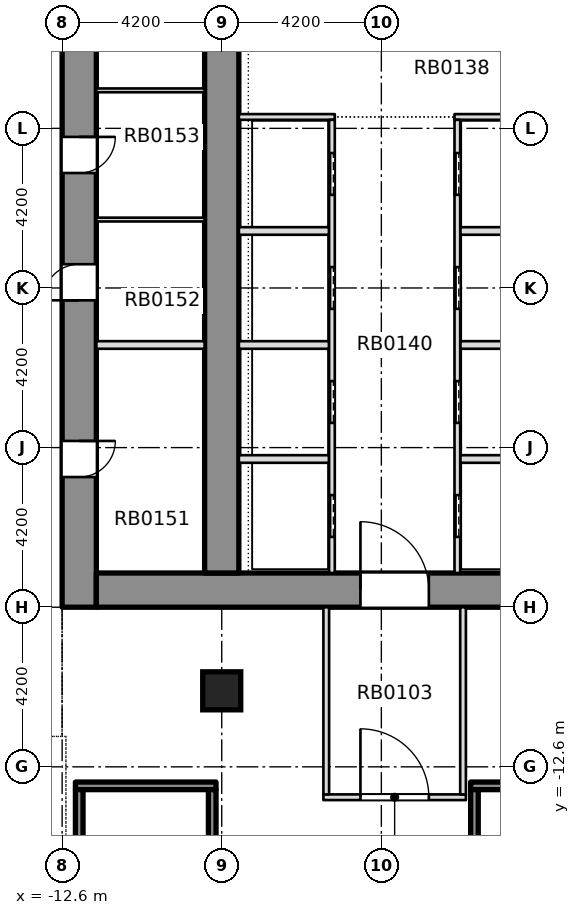
"""IFC4 building model, lengths in metres.
Left out: names, types, materials, properties, quantities, classifications, styles, units other than length and angle.
Written with IfcOpenShell. Run it as: python <this file> out.ifc"""

import sys

from ifc_helpers import new_model, si_unit, direction, frame, frame_2d, origin, origin_2d, place, context, subcontext, project, spatial, rectangle, extrude, element, fill, save


model = new_model("IFC4")
c1 = context("Model", 3, precision=1e-05, world=origin(), true_north=direction((0.0, 1.0)))
c2 = subcontext(c1, "Body", "Model", "MODEL_VIEW")
j1 = project(units=[si_unit("LENGTHUNIT", "METRE"), si_unit("PLANEANGLEUNIT", "RADIAN")], contexts=[c1])
p1 = place(None, origin())
s1 = spatial("IfcSite", under=j1, at=p1, CompositionType="ELEMENT")
p2 = place(p1, origin())
s2 = spatial("IfcBuilding", under=s1, at=p2, CompositionType="ELEMENT")
p3 = place(p2, frame((0.0, 0.0, -4.2)))
s3 = spatial("IfcBuildingStorey", under=s2, at=p3, CompositionType="ELEMENT", Elevation=-4.2)
p4 = place(p3, frame((-12.15, -8.4, -0.35), z_axis=(0.0, 0.0, 1.0), x_axis=(0.0, 1.0, 0.0)))
e1 = element("IfcWall", 1, at=p4, inside=s3, PredefinedType="SHEAR", context=c2, shape_type="SweptSolid", body=[
    extrude(rectangle(XDim=30.15, YDim=0.9, at=frame_2d((15.075, 0.0))), origin(), (0.0, 0.0, 1.0), 4.1),
])
p5 = place(p4, frame((3.425, 0.0, 0.35)))
e2 = element("IfcOpeningElement", 2, at=p5, cuts=e1, PredefinedType="OPENING", context=c2, shape_type="SweptSolid", body=[
    extrude(rectangle(XDim=0.95, YDim=2.1, at=frame_2d((0.475, 1.05))), frame((0.0, 0.46, 0.0), z_axis=(0.0, -1.0, 0.0), x_axis=(1.0, 0.0, 0.0)), (0.0, 0.0, 1.0), 0.92),
])
p6 = place(p4, frame((8.075, 0.0, 0.35)))
e3 = element("IfcOpeningElement", 3, at=p6, cuts=e1, PredefinedType="OPENING", context=c2, shape_type="SweptSolid", body=[
    extrude(rectangle(XDim=0.95, YDim=2.1, at=frame_2d((0.475, 1.05))), frame((0.0, 0.46, 0.0), z_axis=(0.0, -1.0, 0.0), x_axis=(1.0, 0.0, 0.0)), (0.0, 0.0, 1.0), 0.92),
])
p7 = place(p4, frame((11.425, 0.0, 0.35)))
e4 = element("IfcOpeningElement", 4, at=p7, cuts=e1, PredefinedType="OPENING", context=c2, shape_type="SweptSolid", body=[
    extrude(rectangle(XDim=0.95, YDim=2.1, at=frame_2d((0.475, 1.05))), frame((0.0, 0.46, 0.0), z_axis=(0.0, -1.0, 0.0), x_axis=(1.0, 0.0, 0.0)), (0.0, 0.0, 1.0), 0.92),
])
p8 = place(p4, frame((15.625, 0.0, 0.35)))
e5 = element("IfcOpeningElement", 5, at=p8, cuts=e1, PredefinedType="OPENING", context=c2, shape_type="SweptSolid", body=[
    extrude(rectangle(XDim=0.95, YDim=2.1, at=frame_2d((0.475, 1.05))), frame((0.0, 0.46, 0.0), z_axis=(0.0, -1.0, 0.0), x_axis=(1.0, 0.0, 0.0)), (0.0, 0.0, 1.0), 0.92),
])
p9 = place(p4, frame((22.725, 0.0, 0.35)))
e6 = element("IfcOpeningElement", 6, at=p9, cuts=e1, PredefinedType="OPENING", context=c2, shape_type="SweptSolid", body=[
    extrude(rectangle(XDim=0.95, YDim=2.1, at=frame_2d((0.475, 1.05))), frame((0.0, 0.46, 0.0), z_axis=(0.0, -1.0, 0.0), x_axis=(1.0, 0.0, 0.0)), (0.0, 0.0, 1.0), 0.92),
])
p10 = place(p4, frame((26.75, 0.0, 0.35)))
e7 = element("IfcOpeningElement", 7, at=p10, cuts=e1, PredefinedType="OPENING", context=c2, shape_type="SweptSolid", body=[
    extrude(rectangle(XDim=0.95, YDim=2.1, at=frame_2d((0.475, 1.05))), frame((0.0, 0.46, 0.0), z_axis=(0.0, -1.0, 0.0), x_axis=(1.0, 0.0, 0.0)), (0.0, 0.0, 1.0), 0.92),
])
p11 = place(p4, frame((19.3, 0.0, 0.35)))
e8 = element("IfcOpeningElement", 8, at=p11, cuts=e1, PredefinedType="OPENING", context=c2, shape_type="SweptSolid", body=[
    extrude(rectangle(XDim=1.2, YDim=2.1, at=frame_2d((0.6, 1.05))), frame((0.0, 0.46, 0.0), z_axis=(0.0, -1.0, 0.0), x_axis=(1.0, 0.0, 0.0)), (0.0, 0.0, 1.0), 0.92),
])
p12 = place(p3, frame((-11.7, -7.95, -0.35), z_axis=(0.0, 0.0, 1.0), x_axis=(1.0, 0.0, 0.0)))
e9 = element("IfcWall", 9, at=p12, inside=s3, PredefinedType="SHEAR", context=c2, shape_type="SweptSolid", body=[
    extrude(rectangle(XDim=23.4, YDim=0.9, at=frame_2d((11.7, 0.0))), origin(), (0.0, 0.0, 1.0), 4.1),
])
p13 = place(p12, frame((6.95, 0.0, 0.35)))
e10 = element("IfcOpeningElement", 10, at=p13, cuts=e9, PredefinedType="OPENING", context=c2, shape_type="SweptSolid", body=[
    extrude(rectangle(XDim=1.8, YDim=2.1, at=frame_2d((0.9, 1.05))), frame((0.0, 0.46, 0.0), z_axis=(0.0, -1.0, 0.0), x_axis=(1.0, 0.0, 0.0)), (0.0, 0.0, 1.0), 0.92),
])
p14 = place(p12, frame((14.65, 0.0, 0.35)))
e11 = element("IfcOpeningElement", 11, at=p14, cuts=e9, PredefinedType="OPENING", context=c2, shape_type="SweptSolid", body=[
    extrude(rectangle(XDim=1.8, YDim=2.1, at=frame_2d((0.9, 1.05))), frame((0.0, 0.46, 0.0), z_axis=(0.0, -1.0, 0.0), x_axis=(1.0, 0.0, 0.0)), (0.0, 0.0, 1.0), 0.92),
])
p15 = place(p3, frame((-8.4, -7.5, -0.35), z_axis=(0.0, 0.0, 1.0), x_axis=(0.0, 1.0, 0.0)))
e12 = element("IfcWall", 12, at=p15, inside=s3, PredefinedType="SHEAR", context=c2, shape_type="SweptSolid", body=[
    extrude(rectangle(XDim=28.35, YDim=0.9, at=frame_2d((14.175, 0.0))), origin(), (0.0, 0.0, 1.0), 4.1),
])
p16 = place(p15, frame((18.4, 0.0, 0.35)))
e13 = element("IfcOpeningElement", 13, at=p16, cuts=e12, PredefinedType="OPENING", context=c2, shape_type="SweptSolid", body=[
    extrude(rectangle(XDim=1.2, YDim=2.1, at=frame_2d((0.6, 1.05))), frame((0.0, 0.46, 0.0), z_axis=(0.0, -1.0, 0.0), x_axis=(1.0, 0.0, 0.0)), (0.0, 0.0, 1.0), 0.92),
])
p17 = place(p3, frame((-8.4, -10.6, -0.35), z_axis=(0.0, 0.0, 1.0), x_axis=(1.0, 0.0, 0.0)))
e14 = element("IfcColumn", 14, at=p17, inside=s3, PredefinedType="COLUMN", context=c2, shape_type="SweptSolid", body=[
    extrude(rectangle(XDim=1.0, YDim=1.0, at=origin_2d()), origin(), (0.0, 0.0, 1.0), 4.1),
])
p18 = place(p3, frame((-5.725, -13.4, 0.0), z_axis=(0.0, 0.0, 1.0), x_axis=(1.0, 0.0, 0.0)))
e15 = element("IfcWall", 15, at=p18, inside=s3, PredefinedType="PARTITIONING", context=c2, shape_type="SweptSolid", body=[
    extrude(rectangle(XDim=3.75, YDim=0.15, at=frame_2d((1.875, 0.0))), origin(), (0.0, 0.0, 1.0), 3.75),
])
p19 = place(p18, frame((0.975, 0.0, 0.0)))
e16 = element("IfcOpeningElement", 16, at=p19, cuts=e15, PredefinedType="OPENING", context=c2, shape_type="SweptSolid", body=[
    extrude(rectangle(XDim=1.8, YDim=2.1, at=frame_2d((0.9, 1.05))), frame((0.0, 0.085, 0.0), z_axis=(0.0, -1.0, 0.0), x_axis=(1.0, 0.0, 0.0)), (0.0, 0.0, 1.0), 0.17),
])
for number, where, z_axis, x_axis in (
    (17, (-5.65, -13.325, 0.0), (0.0, 0.0, 1.0), (0.0, 1.0, 0.0)),
    (18, (-2.05, -13.325, 0.0), (0.0, 0.0, 1.0), (0.0, 1.0, 0.0)),
):
    element("IfcWall", number, at=place(p3, frame(where, z_axis=z_axis, x_axis=x_axis)), inside=s3, PredefinedType="PARTITIONING", context=c2, shape_type="SweptSolid", body=[
        extrude(rectangle(XDim=4.924, YDim=0.15, at=frame_2d((2.462, 0.0))), origin(), (0.0, 0.0, 1.0), 3.75),
    ])
p20 = place(p3, frame((-7.949, -4.5, 0.0), z_axis=(0.0, 0.0, 1.0), x_axis=(1.0, 0.0, 0.0)))
e19 = element("IfcWall", 19, at=p20, inside=s3, PredefinedType="PARTITIONING", context=c2, shape_type="SweptSolid", body=[
    extrude(rectangle(XDim=2.374, YDim=0.2, at=frame_2d((1.187, 0.0))), origin(), (0.0, 0.0, 1.0), 3.75),
])
p21 = place(p3, frame((-2.125, -4.5, 0.0), z_axis=(0.0, 0.0, 1.0), x_axis=(1.0, 0.0, 0.0)))
e20 = element("IfcWall", 20, at=p21, inside=s3, PredefinedType="PARTITIONING", context=c2, shape_type="SweptSolid", body=[
    extrude(rectangle(XDim=4.25, YDim=0.2, at=frame_2d((2.125, 0.0))), origin(), (0.0, 0.0, 1.0), 3.75),
])
p22 = place(p3, frame((-7.949, -1.5, 0.0), z_axis=(0.0, 0.0, 1.0), x_axis=(1.0, 0.0, 0.0)))
e21 = element("IfcWall", 21, at=p22, inside=s3, PredefinedType="PARTITIONING", context=c2, shape_type="SweptSolid", body=[
    extrude(rectangle(XDim=2.374, YDim=0.2, at=frame_2d((1.187, 0.0))), origin(), (0.0, 0.0, 1.0), 3.75),
])
p23 = place(p3, frame((-2.125, -1.5, 0.0), z_axis=(0.0, 0.0, 1.0), x_axis=(1.0, 0.0, 0.0)))
e22 = element("IfcWall", 22, at=p23, inside=s3, PredefinedType="PARTITIONING", context=c2, shape_type="SweptSolid", body=[
    extrude(rectangle(XDim=4.25, YDim=0.2, at=frame_2d((2.125, 0.0))), origin(), (0.0, 0.0, 1.0), 3.75),
])
p24 = place(p3, frame((-7.949, 1.5, 0.0), z_axis=(0.0, 0.0, 1.0), x_axis=(1.0, 0.0, 0.0)))
e23 = element("IfcWall", 23, at=p24, inside=s3, PredefinedType="PARTITIONING", context=c2, shape_type="SweptSolid", body=[
    extrude(rectangle(XDim=2.374, YDim=0.2, at=frame_2d((1.187, 0.0))), origin(), (0.0, 0.0, 1.0), 3.75),
])
p25 = place(p3, frame((-2.125, 1.5, 0.0), z_axis=(0.0, 0.0, 1.0), x_axis=(1.0, 0.0, 0.0)))
e24 = element("IfcWall", 24, at=p25, inside=s3, PredefinedType="PARTITIONING", context=c2, shape_type="SweptSolid", body=[
    extrude(rectangle(XDim=4.25, YDim=0.2, at=frame_2d((2.125, 0.0))), origin(), (0.0, 0.0, 1.0), 3.75),
])
p26 = place(p3, frame((-7.949, 4.5, 0.0), z_axis=(0.0, 0.0, 1.0), x_axis=(1.0, 0.0, 0.0)))
e25 = element("IfcWall", 25, at=p26, inside=s3, PredefinedType="PARTITIONING", context=c2, shape_type="SweptSolid", body=[
    extrude(rectangle(XDim=2.524, YDim=0.15, at=frame_2d((1.262, 0.0))), origin(), (0.0, 0.0, 1.0), 3.75),
])
p27 = place(p3, frame((-2.275, 4.5, 0.0), z_axis=(0.0, 0.0, 1.0), x_axis=(1.0, 0.0, 0.0)))
e26 = element("IfcWall", 26, at=p27, inside=s3, PredefinedType="PARTITIONING", context=c2, shape_type="SweptSolid", body=[
    extrude(rectangle(XDim=4.55, YDim=0.15, at=frame_2d((2.275, 0.0))), origin(), (0.0, 0.0, 1.0), 3.75),
])
p28 = place(p3, frame((-5.5, -7.499, 0.0), z_axis=(0.0, 0.0, 1.0), x_axis=(0.0, 1.0, 0.0)))
e27 = element("IfcWall", 27, at=p28, inside=s3, PredefinedType="PARTITIONING", context=c2, shape_type="SweptSolid", body=[
    extrude(rectangle(XDim=11.924, YDim=0.15, at=frame_2d((5.962, 0.0))), origin(), (0.0, 0.0, 1.0), 3.75),
])
p29 = place(p28, frame((0.949, 0.0, 0.0)))
e28 = element("IfcOpeningElement", 28, at=p29, cuts=e27, PredefinedType="OPENING", context=c2, shape_type="SweptSolid", body=[
    extrude(rectangle(XDim=1.1, YDim=2.1, at=frame_2d((0.55, 1.05))), frame((0.0, 0.085, 0.0), z_axis=(0.0, -1.0, 0.0), x_axis=(1.0, 0.0, 0.0)), (0.0, 0.0, 1.0), 0.17),
])
p30 = place(p28, frame((3.949, 0.0, 0.0)))
e29 = element("IfcOpeningElement", 29, at=p30, cuts=e27, PredefinedType="OPENING", context=c2, shape_type="SweptSolid", body=[
    extrude(rectangle(XDim=1.1, YDim=2.1, at=frame_2d((0.55, 1.05))), frame((0.0, 0.085, 0.0), z_axis=(0.0, -1.0, 0.0), x_axis=(1.0, 0.0, 0.0)), (0.0, 0.0, 1.0), 0.17),
])
p31 = place(p28, frame((6.949, 0.0, 0.0)))
e30 = element("IfcOpeningElement", 30, at=p31, cuts=e27, PredefinedType="OPENING", context=c2, shape_type="SweptSolid", body=[
    extrude(rectangle(XDim=1.1, YDim=2.1, at=frame_2d((0.55, 1.05))), frame((0.0, 0.085, 0.0), z_axis=(0.0, -1.0, 0.0), x_axis=(1.0, 0.0, 0.0)), (0.0, 0.0, 1.0), 0.17),
])
p32 = place(p28, frame((9.949, 0.0, 0.0)))
e31 = element("IfcOpeningElement", 31, at=p32, cuts=e27, PredefinedType="OPENING", context=c2, shape_type="SweptSolid", body=[
    extrude(rectangle(XDim=1.1, YDim=2.1, at=frame_2d((0.55, 1.05))), frame((0.0, 0.085, 0.0), z_axis=(0.0, -1.0, 0.0), x_axis=(1.0, 0.0, 0.0)), (0.0, 0.0, 1.0), 0.17),
])
p33 = place(p3, frame((-2.2, -7.499, 0.0), z_axis=(0.0, 0.0, 1.0), x_axis=(0.0, 1.0, 0.0)))
e32 = element("IfcWall", 32, at=p33, inside=s3, PredefinedType="PARTITIONING", context=c2, shape_type="SweptSolid", body=[
    extrude(rectangle(XDim=11.924, YDim=0.15, at=frame_2d((5.962, 0.0))), origin(), (0.0, 0.0, 1.0), 3.75),
])
p34 = place(p33, frame((0.949, 0.0, 0.0)))
e33 = element("IfcOpeningElement", 33, at=p34, cuts=e32, PredefinedType="OPENING", context=c2, shape_type="SweptSolid", body=[
    extrude(rectangle(XDim=1.1, YDim=2.1, at=frame_2d((0.55, 1.05))), frame((0.0, 0.085, 0.0), z_axis=(0.0, -1.0, 0.0), x_axis=(1.0, 0.0, 0.0)), (0.0, 0.0, 1.0), 0.17),
])
p35 = place(p33, frame((3.949, 0.0, 0.0)))
e34 = element("IfcOpeningElement", 34, at=p35, cuts=e32, PredefinedType="OPENING", context=c2, shape_type="SweptSolid", body=[
    extrude(rectangle(XDim=1.1, YDim=2.1, at=frame_2d((0.55, 1.05))), frame((0.0, 0.085, 0.0), z_axis=(0.0, -1.0, 0.0), x_axis=(1.0, 0.0, 0.0)), (0.0, 0.0, 1.0), 0.17),
])
p36 = place(p33, frame((6.949, 0.0, 0.0)))
e35 = element("IfcOpeningElement", 35, at=p36, cuts=e32, PredefinedType="OPENING", context=c2, shape_type="SweptSolid", body=[
    extrude(rectangle(XDim=1.1, YDim=2.1, at=frame_2d((0.55, 1.05))), frame((0.0, 0.085, 0.0), z_axis=(0.0, -1.0, 0.0), x_axis=(1.0, 0.0, 0.0)), (0.0, 0.0, 1.0), 0.17),
])
p37 = place(p33, frame((9.949, 0.0, 0.0)))
e36 = element("IfcOpeningElement", 36, at=p37, cuts=e32, PredefinedType="OPENING", context=c2, shape_type="SweptSolid", body=[
    extrude(rectangle(XDim=1.1, YDim=2.1, at=frame_2d((0.55, 1.05))), frame((0.0, 0.085, 0.0), z_axis=(0.0, -1.0, 0.0), x_axis=(1.0, 0.0, 0.0)), (0.0, 0.0, 1.0), 0.17),
])
p38 = place(p3, frame((-11.699, -1.5, 0.0), z_axis=(0.0, 0.0, 1.0), x_axis=(1.0, 0.0, 0.0)))
e37 = element("IfcWall", 37, at=p38, inside=s3, PredefinedType="PARTITIONING", context=c2, shape_type="SweptSolid", body=[
    extrude(rectangle(XDim=2.848, YDim=0.2, at=frame_2d((1.424, 0.0))), origin(), (0.0, 0.0, 1.0), 3.75),
])
for number, where, z_axis, x_axis in (
    (38, (-11.699, 1.8, 0.0), (0.0, 0.0, 1.0), (1.0, 0.0, 0.0)),
    (39, (-11.699, 5.2, 0.0), (0.0, 0.0, 1.0), (1.0, 0.0, 0.0)),
):
    element("IfcWall", number, at=place(p3, frame(where, z_axis=z_axis, x_axis=x_axis)), inside=s3, PredefinedType="PARTITIONING", context=c2, shape_type="SweptSolid", body=[
        extrude(rectangle(XDim=2.848, YDim=0.1, at=frame_2d((1.424, 0.0))), origin(), (0.0, 0.0, 1.0), 3.75),
    ])
p39 = place(p3, frame((-12.25, -13.1, 0.0), z_axis=(0.0, 0.0, 1.0), x_axis=(1.0, 0.0, 0.0)))
e40 = element("IfcWall", 40, at=p39, inside=s3, PredefinedType="SOLIDWALL", context=c2, shape_type="SweptSolid", body=[
    extrude(rectangle(XDim=3.7, YDim=0.2, at=frame_2d((1.85, 0.0))), origin(), (0.0, 0.0, 1.0), 3.75),
])
p40 = place(p3, frame((-12.15, -19.8, 0.0), z_axis=(0.0, 0.0, 1.0), x_axis=(0.0, 1.0, 0.0)))
e41 = element("IfcWall", 41, at=p40, inside=s3, PredefinedType="SOLIDWALL", context=c2, shape_type="SweptSolid", body=[
    extrude(rectangle(XDim=6.6, YDim=0.2, at=frame_2d((3.3, 0.0))), origin(), (0.0, 0.0, 1.0), 3.75),
])
p41 = place(p3, frame((-8.65, -20.3, 0.0), z_axis=(0.0, 0.0, 1.0), x_axis=(0.0, 1.0, 0.0)))
e42 = element("IfcWall", 42, at=p41, inside=s3, PredefinedType="SOLIDWALL", context=c2, shape_type="SweptSolid", body=[
    extrude(rectangle(XDim=7.1, YDim=0.2, at=frame_2d((3.55, 0.0))), origin(), (0.0, 0.0, 1.0), 3.75),
])
p42 = place(p3, frame((-1.85, -13.1, 0.0), z_axis=(0.0, 0.0, 1.0), x_axis=(1.0, 0.0, 0.0)))
e43 = element("IfcWall", 43, at=p42, inside=s3, PredefinedType="SOLIDWALL", context=c2, shape_type="SweptSolid", body=[
    extrude(rectangle(XDim=3.7, YDim=0.2, at=frame_2d((1.85, 0.0))), origin(), (0.0, 0.0, 1.0), 3.75),
])
p43 = place(p3, frame((-1.75, -19.8, 0.0), z_axis=(0.0, 0.0, 1.0), x_axis=(0.0, 1.0, 0.0)))
e44 = element("IfcWall", 44, at=p43, inside=s3, PredefinedType="SOLIDWALL", context=c2, shape_type="SweptSolid", body=[
    extrude(rectangle(XDim=6.6, YDim=0.2, at=frame_2d((3.3, 0.0))), origin(), (0.0, 0.0, 1.0), 3.75),
])
p44 = place(p19, origin())
e45 = element("IfcDoor", 45, at=p44, inside=s3, OperationType="DOUBLE_DOOR_SINGLE_SWING", PredefinedType="DOOR", context=c2, shape_type="SweptSolid", body=[
    extrude(rectangle(XDim=1.8, YDim=2.1, at=frame_2d((0.9, 1.05))), frame((0.0, 0.025, 0.0), z_axis=(0.0, -1.0, 0.0), x_axis=(1.0, 0.0, 0.0)), (0.0, 0.0, 1.0), 0.05),
])
fill(e16, e45)
p45 = place(p29, origin())
e46 = element("IfcDoor", 46, at=p45, inside=s3, OperationType="SLIDING_TO_RIGHT", PredefinedType="DOOR", context=c2, shape_type="SweptSolid", body=[
    extrude(rectangle(XDim=1.1, YDim=2.1, at=frame_2d((0.55, 1.05))), frame((0.0, 0.025, 0.0), z_axis=(0.0, -1.0, 0.0), x_axis=(1.0, 0.0, 0.0)), (0.0, 0.0, 1.0), 0.05),
])
fill(e28, e46)
p46 = place(p30, origin())
e47 = element("IfcDoor", 47, at=p46, inside=s3, OperationType="SLIDING_TO_RIGHT", PredefinedType="DOOR", context=c2, shape_type="SweptSolid", body=[
    extrude(rectangle(XDim=1.1, YDim=2.1, at=frame_2d((0.55, 1.05))), frame((0.0, 0.025, 0.0), z_axis=(0.0, -1.0, 0.0), x_axis=(1.0, 0.0, 0.0)), (0.0, 0.0, 1.0), 0.05),
])
fill(e29, e47)
p47 = place(p31, origin())
e48 = element("IfcDoor", 48, at=p47, inside=s3, OperationType="SLIDING_TO_RIGHT", PredefinedType="DOOR", context=c2, shape_type="SweptSolid", body=[
    extrude(rectangle(XDim=1.1, YDim=2.1, at=frame_2d((0.55, 1.05))), frame((0.0, 0.025, 0.0), z_axis=(0.0, -1.0, 0.0), x_axis=(1.0, 0.0, 0.0)), (0.0, 0.0, 1.0), 0.05),
])
fill(e30, e48)
p48 = place(p32, origin())
e49 = element("IfcDoor", 49, at=p48, inside=s3, OperationType="SLIDING_TO_RIGHT", PredefinedType="DOOR", context=c2, shape_type="SweptSolid", body=[
    extrude(rectangle(XDim=1.1, YDim=2.1, at=frame_2d((0.55, 1.05))), frame((0.0, 0.025, 0.0), z_axis=(0.0, -1.0, 0.0), x_axis=(1.0, 0.0, 0.0)), (0.0, 0.0, 1.0), 0.05),
])
fill(e31, e49)
p49 = place(p34, origin())
e50 = element("IfcDoor", 50, at=p49, inside=s3, OperationType="SLIDING_TO_RIGHT", PredefinedType="DOOR", context=c2, shape_type="SweptSolid", body=[
    extrude(rectangle(XDim=1.1, YDim=2.1, at=frame_2d((0.55, 1.05))), frame((0.0, 0.025, 0.0), z_axis=(0.0, -1.0, 0.0), x_axis=(1.0, 0.0, 0.0)), (0.0, 0.0, 1.0), 0.05),
])
fill(e33, e50)
p50 = place(p35, origin())
e51 = element("IfcDoor", 51, at=p50, inside=s3, OperationType="SLIDING_TO_RIGHT", PredefinedType="DOOR", context=c2, shape_type="SweptSolid", body=[
    extrude(rectangle(XDim=1.1, YDim=2.1, at=frame_2d((0.55, 1.05))), frame((0.0, 0.025, 0.0), z_axis=(0.0, -1.0, 0.0), x_axis=(1.0, 0.0, 0.0)), (0.0, 0.0, 1.0), 0.05),
])
fill(e34, e51)
p51 = place(p36, origin())
e52 = element("IfcDoor", 52, at=p51, inside=s3, OperationType="SLIDING_TO_RIGHT", PredefinedType="DOOR", context=c2, shape_type="SweptSolid", body=[
    extrude(rectangle(XDim=1.1, YDim=2.1, at=frame_2d((0.55, 1.05))), frame((0.0, 0.025, 0.0), z_axis=(0.0, -1.0, 0.0), x_axis=(1.0, 0.0, 0.0)), (0.0, 0.0, 1.0), 0.05),
])
fill(e35, e52)
p52 = place(p37, origin())
e53 = element("IfcDoor", 53, at=p52, inside=s3, OperationType="SLIDING_TO_RIGHT", PredefinedType="DOOR", context=c2, shape_type="SweptSolid", body=[
    extrude(rectangle(XDim=1.1, YDim=2.1, at=frame_2d((0.55, 1.05))), frame((0.0, 0.025, 0.0), z_axis=(0.0, -1.0, 0.0), x_axis=(1.0, 0.0, 0.0)), (0.0, 0.0, 1.0), 0.05),
])
fill(e36, e53)
p53 = place(p13, origin())
e54 = element("IfcDoor", 54, at=p53, inside=s3, OperationType="SINGLE_SWING_LEFT", PredefinedType="DOOR", context=c2, shape_type="SweptSolid", body=[
    extrude(rectangle(XDim=1.8, YDim=2.1, at=frame_2d((0.9, 1.05))), frame((0.0, 0.025, 0.0), z_axis=(0.0, -1.0, 0.0), x_axis=(1.0, 0.0, 0.0)), (0.0, 0.0, 1.0), 0.05),
])
fill(e10, e54)
p54 = place(p5, origin())
e55 = element("IfcDoor", 55, at=p54, inside=s3, OperationType="SINGLE_SWING_LEFT", PredefinedType="DOOR", context=c2, shape_type="SweptSolid", body=[
    extrude(rectangle(XDim=0.95, YDim=2.1, at=frame_2d((0.475, 1.05))), frame((0.0, 0.025, 0.0), z_axis=(0.0, -1.0, 0.0), x_axis=(1.0, 0.0, 0.0)), (0.0, 0.0, 1.0), 0.05),
])
fill(e2, e55)
p55 = place(p6, origin())
e56 = element("IfcDoor", 56, at=p55, inside=s3, OperationType="SINGLE_SWING_LEFT", PredefinedType="DOOR", context=c2, shape_type="SweptSolid", body=[
    extrude(rectangle(XDim=0.95, YDim=2.1, at=frame_2d((0.475, 1.05))), frame((0.0, 0.025, 0.0), z_axis=(0.0, -1.0, 0.0), x_axis=(1.0, 0.0, 0.0)), (0.0, 0.0, 1.0), 0.05),
])
fill(e3, e56)
p56 = place(p7, origin())
e57 = element("IfcDoor", 57, at=p56, inside=s3, OperationType="SINGLE_SWING_LEFT", PredefinedType="DOOR", context=c2, shape_type="SweptSolid", body=[
    extrude(rectangle(XDim=0.95, YDim=2.1, at=frame_2d((0.475, 1.05))), frame((0.0, 0.025, 0.0), z_axis=(0.0, -1.0, 0.0), x_axis=(1.0, 0.0, 0.0)), (0.0, 0.0, 1.0), 0.05),
])
fill(e4, e57)
save(model, sys.argv[1])
